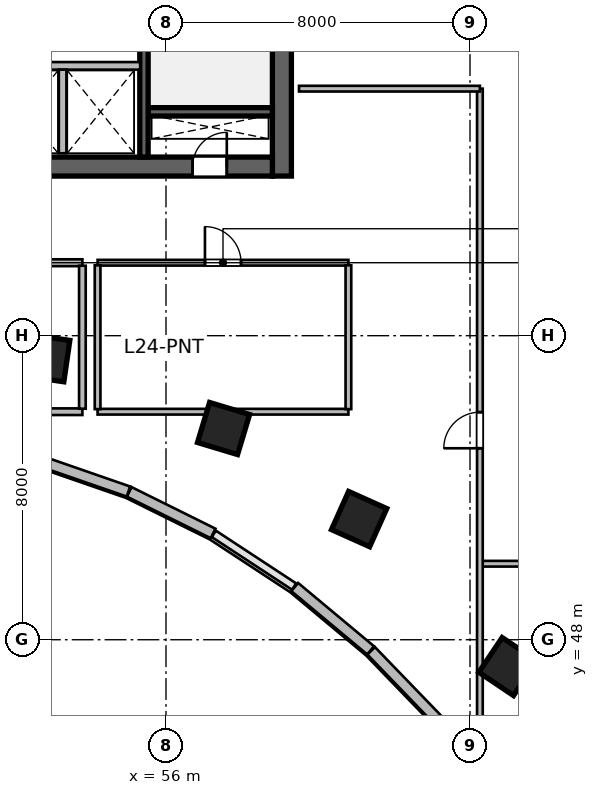
"""IFC4 building model, lengths in metres.
Left out: names, types, materials, properties, quantities, classifications, styles, units other than length and angle.
Written with IfcOpenShell. Run it as: python <this file> out.ifc"""

import sys

from ifc_helpers import new_model, si_unit, direction, frame, frame_2d, origin, origin_2d, place, context, subcontext, project, spatial, rectangle, extrude, source, transform, mapped, element, fill, save


model = new_model("IFC4")
c1 = context("Model", 3, precision=1e-05, world=origin(), true_north=direction((0.0, 1.0)))
c2 = subcontext(c1, "Body", "Model", "MODEL_VIEW")
j1 = project(units=[si_unit("LENGTHUNIT", "METRE"), si_unit("PLANEANGLEUNIT", "RADIAN")], contexts=[c1])
p1 = place(None, origin())
s1 = spatial("IfcSite", under=j1, at=p1, CompositionType="ELEMENT")
p2 = place(p1, origin())
s2 = spatial("IfcBuilding", under=s1, at=p2, CompositionType="ELEMENT")
p3 = place(p2, frame((0.0, 0.0, 103.8)))
s3 = spatial("IfcBuildingStorey", under=s2, at=p3, CompositionType="ELEMENT", Elevation=103.8)
m1 = source(origin(), c2, "Body", "SweptSolid", [
    extrude(rectangle(XDim=12.0, YDim=0.5, at=frame_2d((6.0, 0.0))), origin(), (0.0, 0.0, 1.0), 3.9),
])
p4 = place(p3, frame((59.05, 60.2, 0.0), z_axis=(0.0, 0.0, 1.0), x_axis=(0.0, 1.0, 0.0)))
e1 = element("IfcWall", 1, at=p4, inside=s3, PredefinedType="SHEAR", context=c2, shape_type="MappedRepresentation", body=[
    mapped(m1, transform((0.0, 0.0, 0.0), scale=1.0)),
])
m2 = source(origin(), c2, "Body", "SweptSolid", [
    extrude(rectangle(XDim=21.6, YDim=0.5, at=frame_2d((10.8, 0.0))), origin(), (0.0, 0.0, 1.0), 3.9),
])
p5 = place(p3, frame((37.2, 60.45, 0.0), z_axis=(0.0, 0.0, 1.0), x_axis=(1.0, 0.0, 0.0)))
e2 = element("IfcWall", 2, at=p5, inside=s3, PredefinedType="SHEAR", context=c2, shape_type="MappedRepresentation", body=[
    mapped(m2, transform((0.0, 0.0, 0.0), scale=1.0)),
])
p6 = place(p5, frame((1.1, 0.0, 0.0)))
e3 = element("IfcOpeningElement", 3, at=p6, cuts=e2, PredefinedType="OPENING", context=c2, shape_type="SweptSolid", body=[
    extrude(rectangle(XDim=1.15, YDim=2.15, at=frame_2d((0.575, 1.075))), frame((0.0, 0.26, 0.0), z_axis=(0.0, -1.0, 0.0), x_axis=(1.0, 0.0, 0.0)), (0.0, 0.0, 1.0), 0.52),
])
p7 = place(p5, frame((19.5, 0.0, 0.0)))
e4 = element("IfcOpeningElement", 4, at=p7, cuts=e2, PredefinedType="OPENING", context=c2, shape_type="SweptSolid", body=[
    extrude(rectangle(XDim=0.9, YDim=2.1, at=frame_2d((0.45, 1.05))), frame((0.0, 0.26, 0.0), z_axis=(0.0, -1.0, 0.0), x_axis=(1.0, 0.0, 0.0)), (0.0, 0.0, 1.0), 0.52),
])
p8 = place(p5, frame((12.02, 0.0, 0.0)))
e5 = element("IfcOpeningElement", 5, at=p8, cuts=e2, PredefinedType="OPENING", context=c2, shape_type="SweptSolid", body=[
    extrude(rectangle(XDim=1.6, YDim=2.15, at=frame_2d((0.8, 1.075))), frame((0.0, 0.26, 0.0), z_axis=(0.0, -1.0, 0.0), x_axis=(1.0, 0.0, 0.0)), (0.0, 0.0, 1.0), 0.52),
])
m3 = source(origin(), c2, "Body", "SweptSolid", [
    extrude(rectangle(XDim=3.27, YDim=0.22, at=frame_2d((1.635, 0.0))), origin(), (0.0, 0.0, 1.0), 3.9),
])
p9 = place(p3, frame((55.53, 61.89, 0.0), z_axis=(0.0, 0.0, 1.0), x_axis=(1.0, 0.0, 0.0)))
e6 = element("IfcWall", 6, at=p9, inside=s3, PredefinedType="SHEAR", context=c2, shape_type="MappedRepresentation", body=[
    mapped(m3, transform((0.0, 0.0, 0.0), scale=1.0)),
])
m4 = source(origin(), c2, "Body", "SweptSolid", [
    extrude(rectangle(XDim=11.0, YDim=0.22, at=frame_2d((5.5, 0.0))), origin(), (0.0, 0.0, 1.0), 3.9),
])
p10 = place(p3, frame((55.42, 60.7, 0.0), z_axis=(0.0, 0.0, 1.0), x_axis=(0.0, 1.0, 0.0)))
e7 = element("IfcWall", 7, at=p10, inside=s3, PredefinedType="SHEAR", context=c2, shape_type="MappedRepresentation", body=[
    mapped(m4, transform((0.0, 0.0, 0.0), scale=1.0)),
])
p11 = place(p10, frame((9.545, 0.0, 0.0)))
e8 = element("IfcOpeningElement", 8, at=p11, cuts=e7, PredefinedType="OPENING", context=c2, shape_type="SweptSolid", body=[
    extrude(rectangle(XDim=1.15, YDim=2.15, at=frame_2d((0.575, 1.075))), frame((0.0, 0.12, 0.0), z_axis=(0.0, -1.0, 0.0), x_axis=(1.0, 0.0, 0.0)), (0.0, 0.0, 1.0), 0.24),
])
m5 = source(origin(), c2, "Body", "SweptSolid", [
    extrude(rectangle(XDim=1.1, YDim=1.1, at=origin_2d()), origin(), (0.0, 0.0, 1.0), 3.9),
])
for number, where, z_axis, x_axis in (
    (9, (52.846, 55.411, 0.0), (0.0, 0.0, 1.0), (0.143, 0.99, 0.0)),
    (10, (57.515, 53.558, 0.0), (0.0, 0.0, 1.0), (0.289, 0.957, 0.0)),
    (11, (61.082, 51.175, 0.0), (0.0, 0.0, 1.0), (0.409, 0.912, 0.0)),
    (12, (64.996, 47.294, 0.0), (0.0, 0.0, 1.0), (0.558, 0.83, 0.0)),
):
    element("IfcColumn", number, at=place(p3, frame(where, z_axis=z_axis, x_axis=x_axis)), inside=s3, PredefinedType="COLUMN", context=c2, shape_type="MappedRepresentation", body=[
        mapped(m5, transform((0.0, 0.0, 0.0), scale=1.0)),
    ])
m6 = source(origin(), c2, "Body", "SweptSolid", [
    extrude(rectangle(XDim=2.68, YDim=0.28, at=frame_2d((1.34, 0.0))), origin(), (0.0, 0.0, 1.0), 3.65),
])
p12 = place(p3, frame((63.26, 45.78, 0.0), z_axis=(0.0, 0.0, 1.0), x_axis=(-0.694561996568, 0.719432855049, 0.0)))
e13 = element("IfcWall", 13, at=p12, inside=s3, PredefinedType="SOLIDWALL", context=c2, shape_type="MappedRepresentation", body=[
    mapped(m6, transform((0.0, 0.0, 0.0), scale=1.0)),
])
m7 = source(origin(), c2, "Body", "SweptSolid", [
    extrude(rectangle(XDim=2.601, YDim=0.28, at=frame_2d((1.3, 0.0))), origin(), (0.0, 0.0, 1.0), 3.65),
])
p13 = place(p3, frame((61.385, 47.721, 0.0), z_axis=(0.0, 0.0, 1.0), x_axis=(-0.76796730295, 0.640489048775, 0.0)))
e14 = element("IfcWall", 14, at=p13, inside=s3, PredefinedType="SOLIDWALL", context=c2, shape_type="MappedRepresentation", body=[
    mapped(m7, transform((0.0, 0.0, 0.0), scale=1.0)),
])
m8 = source(origin(), c2, "Body", "SweptSolid", [
    extrude(rectangle(XDim=2.462, YDim=0.28, at=frame_2d((1.231, 0.0))), origin(), (0.0, 0.0, 1.0), 3.65),
])
p14 = place(p3, frame((57.239, 50.797, 0.0), z_axis=(0.0, 0.0, 1.0), x_axis=(-0.8959882207, 0.444077817917, 0.0)))
e15 = element("IfcWall", 15, at=p14, inside=s3, PredefinedType="SOLIDWALL", context=c2, shape_type="MappedRepresentation", body=[
    mapped(m8, transform((0.0, 0.0, 0.0), scale=1.0)),
])
m9 = source(origin(), c2, "Body", "SweptSolid", [
    extrude(rectangle(XDim=2.411, YDim=0.28, at=frame_2d((1.205, 0.0))), origin(), (0.0, 0.0, 1.0), 3.65),
])
p15 = place(p3, frame((55.012, 51.899, 0.0), z_axis=(0.0, 0.0, 1.0), x_axis=(-0.944880068161, 0.327416640982, 0.0)))
e16 = element("IfcWall", 16, at=p15, inside=s3, PredefinedType="SOLIDWALL", context=c2, shape_type="MappedRepresentation", body=[
    mapped(m9, transform((0.0, 0.0, 0.0), scale=1.0)),
])
m10 = source(origin(), c2, "Body", "SweptSolid", [
    extrude(rectangle(XDim=4.1, YDim=0.2, at=frame_2d((2.05, 0.0))), origin(), (0.0, 0.0, 1.0), 3.65),
])
p16 = place(p3, frame((51.22, 63.1, 0.0), z_axis=(0.0, 0.0, 1.0), x_axis=(1.0, 0.0, 0.0)))
e17 = element("IfcWall", 17, at=p16, inside=s3, PredefinedType="SOLIDWALL", context=c2, shape_type="MappedRepresentation", body=[
    mapped(m10, transform((0.0, 0.0, 0.0), scale=1.0)),
])
m11 = source(origin(), c2, "Body", "SweptSolid", [
    extrude(rectangle(XDim=2.2, YDim=0.2, at=frame_2d((1.1, 0.0))), origin(), (0.0, 0.0, 1.0), 3.65),
])
p17 = place(p3, frame((53.28, 60.8, 0.0), z_axis=(0.0, 0.0, 1.0), x_axis=(0.0, 1.0, 0.0)))
e18 = element("IfcWall", 18, at=p17, inside=s3, PredefinedType="SOLIDWALL", context=c2, shape_type="MappedRepresentation", body=[
    mapped(m11, transform((0.0, 0.0, 0.0), scale=1.0)),
])
m12 = source(origin(), c2, "Body", "SweptSolid", [
    extrude(rectangle(XDim=3.248, YDim=0.175, at=frame_2d((1.624, 0.0))), origin(), (0.0, 0.0, 1.0), 3.65),
])
p18 = place(p3, frame((50.552, 54.0, 0.0), z_axis=(0.0, 0.0, 1.0), x_axis=(1.0, 0.0, 0.0)))
e19 = element("IfcWall", 19, at=p18, inside=s3, PredefinedType="PARTITIONING", context=c2, shape_type="MappedRepresentation", body=[
    mapped(m12, transform((0.0, 0.0, 0.0), scale=1.0)),
])
m13 = source(origin(), c2, "Body", "SweptSolid", [
    extrude(rectangle(XDim=3.248, YDim=0.18, at=frame_2d((1.624, 0.0))), origin(), (0.0, 0.0, 1.0), 3.65),
])
p19 = place(p3, frame((50.552, 57.92, 0.0), z_axis=(0.0, 0.0, 1.0), x_axis=(1.0, 0.0, 0.0)))
e20 = element("IfcWall", 20, at=p19, inside=s3, PredefinedType="PLUMBINGWALL", context=c2, shape_type="MappedRepresentation", body=[
    mapped(m13, transform((0.0, 0.0, 0.0), scale=1.0)),
])
p20 = place(p19, frame((1.149, 0.0, 0.0)))
e21 = element("IfcOpeningElement", 21, at=p20, cuts=e20, PredefinedType="OPENING", context=c2, shape_type="SweptSolid", body=[
    extrude(rectangle(XDim=0.95, YDim=2.12, at=frame_2d((0.475, 1.06))), frame((0.0, 0.1, 0.0), z_axis=(0.0, -1.0, 0.0), x_axis=(1.0, 0.0, 0.0)), (0.0, 0.0, 1.0), 0.2),
])
m14 = source(origin(), c2, "Body", "SweptSolid", [
    extrude(rectangle(XDim=3.763, YDim=0.175, at=frame_2d((1.881, 0.0))), origin(), (0.0, 0.0, 1.0), 3.65),
])
p21 = place(p3, frame((53.8, 54.079, 0.0), z_axis=(0.0, 0.0, 1.0), x_axis=(0.0, 1.0, 0.0)))
e22 = element("IfcWall", 22, at=p21, inside=s3, PredefinedType="PARTITIONING", context=c2, shape_type="MappedRepresentation", body=[
    mapped(m14, transform((0.0, 0.0, 0.0), scale=1.0)),
])
m15 = source(origin(), c2, "Body", "SweptSolid", [
    extrude(rectangle(XDim=6.6, YDim=0.15, at=frame_2d((3.3, 0.0))), origin(), (0.0, 0.0, 1.0), 3.095),
])
p22 = place(p3, frame((54.2, 54.0, 0.0), z_axis=(0.0, 0.0, 1.0), x_axis=(1.0, 0.0, 0.0)))
e23 = element("IfcWall", 23, at=p22, inside=s3, PredefinedType="PARTITIONING", context=c2, shape_type="MappedRepresentation", body=[
    mapped(m15, transform((0.0, 0.0, 0.0), scale=1.0)),
])
m16 = source(origin(), c2, "Body", "SweptSolid", [
    extrude(rectangle(XDim=6.6, YDim=0.15, at=frame_2d((3.3, 0.0))), origin(), (0.0, 0.0, 1.0), 3.65),
])
p23 = place(p3, frame((54.2, 57.92, 0.0), z_axis=(0.0, 0.0, 1.0), x_axis=(1.0, 0.0, 0.0)))
e24 = element("IfcWall", 24, at=p23, inside=s3, PredefinedType="PARTITIONING", context=c2, shape_type="MappedRepresentation", body=[
    mapped(m16, transform((0.0, 0.0, 0.0), scale=1.0)),
])
p24 = place(p23, frame((2.825, 0.0, 0.0)))
e25 = element("IfcOpeningElement", 25, at=p24, cuts=e24, PredefinedType="OPENING", context=c2, shape_type="SweptSolid", body=[
    extrude(rectangle(XDim=0.95, YDim=2.1, at=frame_2d((0.475, 1.05))), frame((0.0, 0.085, 0.0), z_axis=(0.0, -1.0, 0.0), x_axis=(1.0, 0.0, 0.0)), (0.0, 0.0, 1.0), 0.17),
])
m17 = source(origin(), c2, "Body", "SweptSolid", [
    extrude(rectangle(XDim=3.785, YDim=0.15, at=frame_2d((1.893, 0.0))), origin(), (0.0, 0.0, 1.0), 3.65),
])
for number, where, z_axis, x_axis in (
    (26, (54.2, 54.067, 0.0), (0.0, 0.0, 1.0), (0.0, 1.0, 0.0)),
    (27, (60.8, 54.067, 0.0), (0.0, 0.0, 1.0), (0.0, 1.0, 0.0)),
):
    element("IfcWall", number, at=place(p3, frame(where, z_axis=z_axis, x_axis=x_axis)), inside=s3, PredefinedType="PARTITIONING", context=c2, shape_type="MappedRepresentation", body=[
        mapped(m17, transform((0.0, 0.0, 0.0), scale=1.0)),
    ])
m18 = source(origin(), c2, "Body", "SweptSolid", [
    extrude(rectangle(XDim=2.5, YDim=0.15, at=frame_2d((1.25, 0.0))), origin(), (0.0, 0.0, 1.0), 3.65),
])
p25 = place(p3, frame((64.3, 50.0, 0.0), z_axis=(0.0, 0.0, 1.0), x_axis=(1.0, 0.0, 0.0)))
e28 = element("IfcWall", 28, at=p25, inside=s3, PredefinedType="PARTITIONING", context=c2, shape_type="MappedRepresentation", body=[
    mapped(m18, transform((0.0, 0.0, 0.0), scale=1.0)),
])
m19 = source(origin(), c2, "Body", "SweptSolid", [
    extrude(rectangle(XDim=17.974, YDim=0.15, at=frame_2d((8.987, 0.0))), origin(), (0.0, 0.0, 1.0), 2.942),
])
p26 = place(p3, frame((64.26, 44.526, 0.0), z_axis=(0.0, 0.0, 1.0), x_axis=(0.0, 1.0, 0.0)))
e29 = element("IfcWall", 29, at=p26, inside=s3, PredefinedType="PARTITIONING", context=c2, shape_type="MappedRepresentation", body=[
    mapped(m19, transform((0.0, 0.0, 0.0), scale=1.0)),
])
p27 = place(p26, frame((8.512, 0.0, 0.0)))
e30 = element("IfcOpeningElement", 30, at=p27, cuts=e29, PredefinedType="OPENING", context=c2, shape_type="SweptSolid", body=[
    extrude(rectangle(XDim=0.95, YDim=2.1, at=frame_2d((0.475, 1.05))), frame((0.0, 0.085, 0.0), z_axis=(0.0, -1.0, 0.0), x_axis=(1.0, 0.0, 0.0)), (0.0, 0.0, 1.0), 0.17),
])
m20 = source(origin(), c2, "Body", "SweptSolid", [
    extrude(rectangle(XDim=4.76, YDim=0.15, at=frame_2d((2.38, 0.0))), origin(), (0.0, 0.0, 1.0), 3.65),
])
p28 = place(p3, frame((59.5, 62.5, 0.0), z_axis=(0.0, 0.0, 1.0), x_axis=(1.0, 0.0, 0.0)))
e31 = element("IfcWall", 31, at=p28, inside=s3, PredefinedType="PARTITIONING", context=c2, shape_type="MappedRepresentation", body=[
    mapped(m20, transform((0.0, 0.0, 0.0), scale=1.0)),
])
m21 = source(origin(), c2, "Body", "SweptSolid", [
    extrude(rectangle(XDim=0.9, YDim=2.1, at=frame_2d((0.45, 1.05))), frame((0.0, 0.025, 0.0), z_axis=(0.0, -1.0, 0.0), x_axis=(1.0, 0.0, 0.0)), (0.0, 0.0, 1.0), 0.05),
])
p29 = place(p7, origin())
e32 = element("IfcDoor", 32, at=p29, inside=s3, OperationType="SINGLE_SWING_RIGHT", PredefinedType="DOOR", context=c2, shape_type="MappedRepresentation", body=[
    mapped(m21, transform((0.0, 0.0, 0.0), scale=1.0)),
])
fill(e4, e32)
m22 = source(origin(), c2, "Body", "SweptSolid", [
    extrude(rectangle(XDim=0.95, YDim=2.1, at=frame_2d((0.475, 1.05))), frame((0.0, 0.025, 0.0), z_axis=(0.0, -1.0, 0.0), x_axis=(1.0, 0.0, 0.0)), (0.0, 0.0, 1.0), 0.05),
])
p30 = place(p24, origin())
e33 = element("IfcDoor", 33, at=p30, inside=s3, OperationType="SINGLE_SWING_LEFT", PredefinedType="DOOR", context=c2, shape_type="MappedRepresentation", body=[
    mapped(m22, transform((0.0, 0.0, 0.0), scale=1.0)),
])
fill(e25, e33)
p31 = place(p27, origin())
e34 = element("IfcDoor", 34, at=p31, inside=s3, OperationType="SINGLE_SWING_LEFT", PredefinedType="DOOR", context=c2, shape_type="MappedRepresentation", body=[
    mapped(m22, transform((0.0, 0.0, 0.0), scale=1.0)),
])
fill(e30, e34)
save(model, sys.argv[1])
